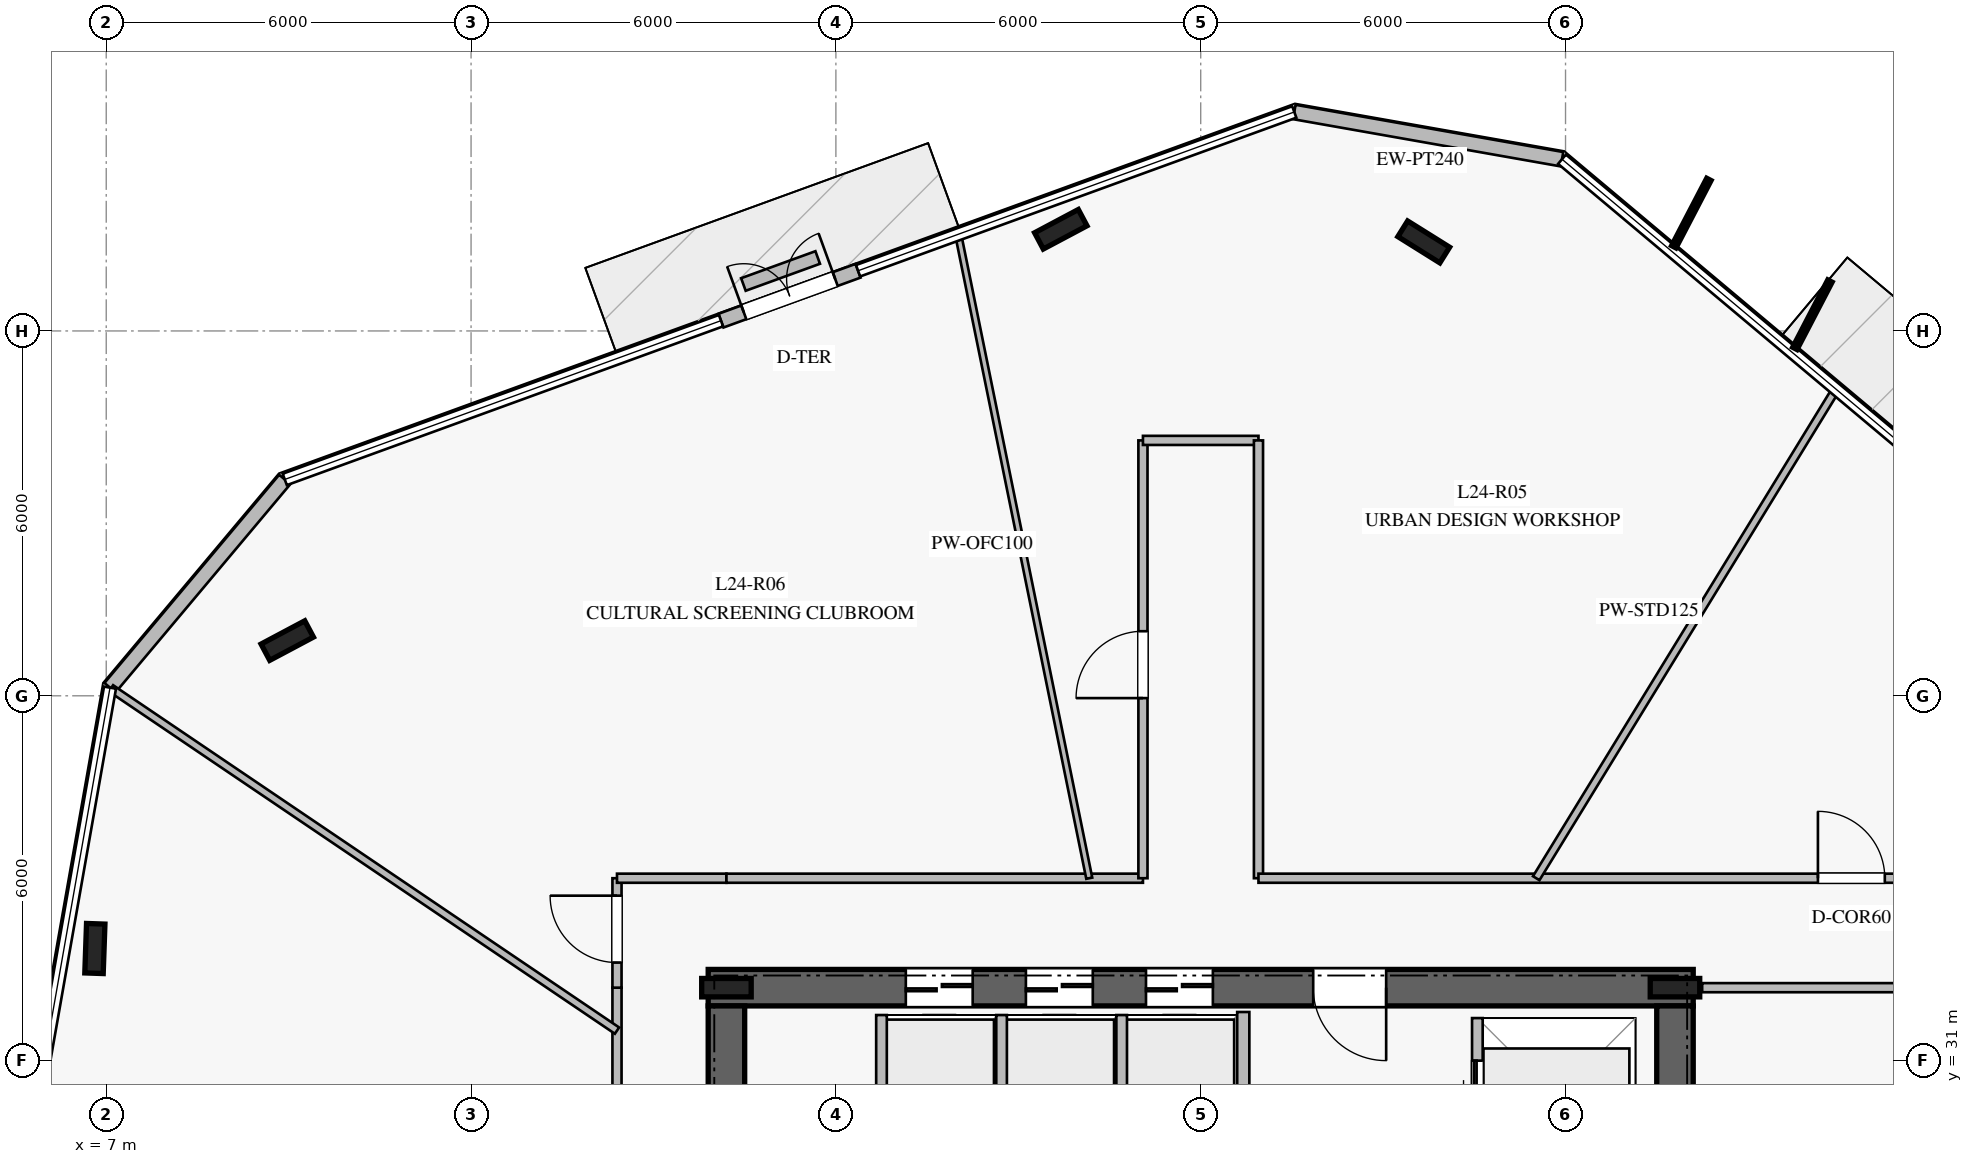
"""IFC4 building model, lengths in metres.
Left out: names, types, materials, properties, quantities, classifications, styles, units other than length and angle.
Written with IfcOpenShell. Run it as: python <this file> out.ifc"""

import sys

from ifc_helpers import new_model, si_unit, direction, frame, frame_2d, origin, origin_2d, place, context, subcontext, project, spatial, rectangle, i_section, extrude, element, fill, save


model = new_model("IFC4")
c1 = context("Model", 3, precision=1e-05, world=origin(), true_north=direction((0.0, 1.0)))
c2 = subcontext(c1, "Body", "Model", "MODEL_VIEW")
j1 = project(units=[si_unit("LENGTHUNIT", "METRE"), si_unit("PLANEANGLEUNIT", "RADIAN")], contexts=[c1])
p1 = place(None, origin())
s1 = spatial("IfcSite", under=j1, at=p1, CompositionType="ELEMENT")
p2 = place(p1, origin())
s2 = spatial("IfcBuilding", under=s1, at=p2, CompositionType="ELEMENT")
p3 = place(p2, frame((0.0, 0.0, 102.4)))
s3 = spatial("IfcBuildingStorey", under=s2, at=p3, CompositionType="ELEMENT", Elevation=102.4)
p4 = place(p3, frame((33.1, 32.2, 0.0), z_axis=(0.0, 0.0, 1.0), x_axis=(-1.0, 0.0, 0.0)))
e1 = element("IfcWall", 1, at=p4, inside=s3, PredefinedType="SHEAR", context=c2, shape_type="SweptSolid", body=[
    extrude(rectangle(XDim=16.2, YDim=0.6, at=frame_2d((8.1, 0.0))), origin(), (0.0, 0.0, 1.0), 3.76),
])
p5 = place(p4, frame((5.05, 0.0, 0.0)))
e2 = element("IfcOpeningElement", 2, at=p5, cuts=e1, PredefinedType="OPENING", context=c2, shape_type="SweptSolid", body=[
    extrude(rectangle(XDim=1.2, YDim=2.25, at=frame_2d((0.6, 1.125))), frame((0.0, 0.31, 0.0), z_axis=(0.0, -1.0, 0.0), x_axis=(1.0, 0.0, 0.0)), (0.0, 0.0, 1.0), 0.62),
])
p6 = place(p4, frame((11.85, 0.0, 0.0)))
e3 = element("IfcOpeningElement", 3, at=p6, cuts=e1, PredefinedType="OPENING", context=c2, shape_type="SweptSolid", body=[
    extrude(rectangle(XDim=1.1, YDim=2.2, at=frame_2d((0.55, 1.1))), frame((0.0, 0.31, 0.0), z_axis=(0.0, -1.0, 0.0), x_axis=(1.0, 0.0, 0.0)), (0.0, 0.0, 1.0), 0.62),
])
p7 = place(p4, frame((9.875, 0.0, 0.0)))
e4 = element("IfcOpeningElement", 4, at=p7, cuts=e1, PredefinedType="OPENING", context=c2, shape_type="SweptSolid", body=[
    extrude(rectangle(XDim=1.1, YDim=2.2, at=frame_2d((0.55, 1.1))), frame((0.0, 0.31, 0.0), z_axis=(0.0, -1.0, 0.0), x_axis=(1.0, 0.0, 0.0)), (0.0, 0.0, 1.0), 0.62),
])
p8 = place(p4, frame((7.9, 0.0, 0.0)))
e5 = element("IfcOpeningElement", 5, at=p8, cuts=e1, PredefinedType="OPENING", context=c2, shape_type="SweptSolid", body=[
    extrude(rectangle(XDim=1.1, YDim=2.2, at=frame_2d((0.55, 1.1))), frame((0.0, 0.31, 0.0), z_axis=(0.0, -1.0, 0.0), x_axis=(1.0, 0.0, 0.0)), (0.0, 0.0, 1.0), 0.62),
])
p9 = place(p3, frame((17.2, 31.9, 0.0), z_axis=(0.0, 0.0, 1.0), x_axis=(0.0, -1.0, 0.0)))
e6 = element("IfcWall", 6, at=p9, inside=s3, PredefinedType="SHEAR", context=c2, shape_type="SweptSolid", body=[
    extrude(rectangle(XDim=13.8, YDim=0.6, at=frame_2d((6.9, 0.0))), origin(), (0.0, 0.0, 1.0), 3.76),
])
p10 = place(p9, frame((2.05, 0.0, 0.0)))
e7 = element("IfcOpeningElement", 7, at=p10, cuts=e6, PredefinedType="OPENING", context=c2, shape_type="SweptSolid", body=[
    extrude(rectangle(XDim=1.5, YDim=2.2, at=frame_2d((0.75, 1.1))), frame((0.0, 0.31, 0.0), z_axis=(0.0, -1.0, 0.0), x_axis=(1.0, 0.0, 0.0)), (0.0, 0.0, 1.0), 0.62),
])
p11 = place(p3, frame((32.8, 18.1, 0.0), z_axis=(0.0, 0.0, 1.0), x_axis=(0.0, 1.0, 0.0)))
e8 = element("IfcWall", 8, at=p11, inside=s3, PredefinedType="SHEAR", context=c2, shape_type="SweptSolid", body=[
    extrude(rectangle(XDim=13.8, YDim=0.6, at=frame_2d((6.9, 0.0))), origin(), (0.0, 0.0, 1.0), 3.76),
])
for number, where, z_axis, x_axis in (
    (9, (32.8, 32.2, 0.0), (0.0, 0.0, 1.0), (1.0, 0.0, 0.0)),
    (10, (17.2, 32.2, 0.0), (0.0, 0.0, 1.0), (1.0, 0.0, 0.0)),
    (11, (28.668, 44.464, 0.0), (0.0, 0.0, 1.0), (-0.848, 0.53, 0.0)),
    (12, (22.699, 44.672, 0.0), (0.0, 0.0, 1.0), (0.883, 0.469, 0.0)),
    (13, (9.977, 37.908, 0.0), (0.0, 0.0, 1.0), (0.883, 0.469, 0.0)),
    (14, (6.813, 32.844, 0.0), (0.0, 0.0, 1.0), (0.035, 0.999, 0.0)),
):
    element("IfcColumn", number, at=place(p3, frame(where, z_axis=z_axis, x_axis=x_axis)), inside=s3, PredefinedType="COLUMN", context=c2, shape_type="SweptSolid", body=[
        extrude(i_section(OverallWidth=0.303, OverallDepth=0.814, WebThickness=0.021, FlangeThickness=0.04, at=origin_2d()), origin(), (0.0, 0.0, 1.0), 4.0),
    ])
p12 = place(p3, frame((30.942, 45.824, 0.0), z_axis=(0.0, 0.0, 1.0), x_axis=(-0.984778610825, 0.173813370204, 0.0)))
e15 = element("IfcWall", 15, at=p12, inside=s3, PredefinedType="STANDARD", context=c2, shape_type="SweptSolid", body=[
    extrude(rectangle(XDim=4.471, YDim=0.24, at=frame_2d((2.235, 0.0))), origin(), (0.0, 0.0, 1.0), 3.76),
])
p13 = place(p3, frame((19.365, 43.99, 0.0), z_axis=(0.0, 0.0, 1.0), x_axis=(-0.939647786753, -0.342143298706, 0.0)))
e16 = element("IfcWall", 16, at=p13, inside=s3, PredefinedType="STANDARD", context=c2, shape_type="SweptSolid", body=[
    extrude(rectangle(XDim=2.4, YDim=0.24, at=frame_2d((1.2, 0.0))), origin(), (0.0, 0.0, 1.0), 3.76),
])
p14 = place(p13, frame((0.4, 0.0, 0.0)))
e17 = element("IfcOpeningElement", 17, at=p14, cuts=e16, PredefinedType="OPENING", context=c2, shape_type="SweptSolid", body=[
    extrude(rectangle(XDim=1.6, YDim=2.25, at=frame_2d((0.8, 1.125))), frame((0.0, 0.13, 0.0), z_axis=(0.0, -1.0, 0.0), x_axis=(1.0, 0.0, 0.0)), (0.0, 0.0, 1.0), 0.26),
])
p15 = place(p3, frame((9.936, 40.558, 0.0), z_axis=(0.0, 0.0, 1.0), x_axis=(-0.642903862685, -0.765946880237, 0.0)))
e18 = element("IfcWall", 18, at=p15, inside=s3, PredefinedType="STANDARD", context=c2, shape_type="SweptSolid", body=[
    extrude(rectangle(XDim=4.47, YDim=0.24, at=frame_2d((2.235, 0.0))), origin(), (0.0, 0.0, 1.0), 3.76),
])
p16 = place(p3, frame((18.701, 44.208, 0.0), z_axis=(0.0, 0.0, 1.0), x_axis=(-0.93985371871, -0.341577205661, 0.0)))
e19 = element("IfcWall", 19, at=p16, inside=s3, PredefinedType="USERDEFINED", context=c2, shape_type="SweptSolid", body=[
    extrude(rectangle(XDim=1.3, YDim=0.22, at=frame_2d((0.65, 0.0))), origin(), (0.0, 0.0, 1.0), 0.4),
])
p17 = place(p3, frame((25.7, 26.65, 0.0), z_axis=(0.0, 0.0, 1.0), x_axis=(0.0, 1.0, 0.0)))
e20 = element("IfcWall", 20, at=p17, inside=s3, PredefinedType="PARTITIONING", context=c2, shape_type="SweptSolid", body=[
    extrude(rectangle(XDim=5.15, YDim=0.2, at=frame_2d((2.575, 0.0))), origin(), (0.0, 0.0, 1.0), 3.76),
])
for number, where, z_axis, x_axis in (
    (21, (19.75, 29.4, 0.0), (0.0, 0.0, 1.0), (0.0, 1.0, 0.0)),
    (22, (21.725, 29.4, 0.0), (0.0, 0.0, 1.0), (0.0, 1.0, 0.0)),
    (23, (23.7, 29.4, 0.0), (0.0, 0.0, 1.0), (0.0, 1.0, 0.0)),
):
    element("IfcWall", number, at=place(p3, frame(where, z_axis=z_axis, x_axis=x_axis)), inside=s3, PredefinedType="PARTITIONING", context=c2, shape_type="SweptSolid", body=[
        extrude(rectangle(XDim=2.35, YDim=0.175, at=frame_2d((1.175, 0.0))), origin(), (0.0, 0.0, 1.0), 3.76),
    ])
p18 = place(p3, frame((29.55, 29.1, 0.0), z_axis=(0.0, 0.0, 1.0), x_axis=(0.0, 1.0, 0.0)))
e24 = element("IfcWall", 24, at=p18, inside=s3, PredefinedType="PARTITIONING", context=c2, shape_type="SweptSolid", body=[
    extrude(rectangle(XDim=2.6, YDim=0.175, at=frame_2d((1.3, 0.0))), origin(), (0.0, 0.0, 1.0), 3.76),
])
p19 = place(p18, frame((0.7, 0.0, 0.0)))
e25 = element("IfcOpeningElement", 25, at=p19, cuts=e24, PredefinedType="OPENING", context=c2, shape_type="SweptSolid", body=[
    extrude(rectangle(XDim=1.2, YDim=2.2, at=frame_2d((0.6, 1.1))), frame((0.0, 0.098, 0.0), z_axis=(0.0, -1.0, 0.0), x_axis=(1.0, 0.0, 0.0)), (0.0, 0.0, 1.0), 0.195),
])
p20 = place(p3, frame((15.4, 25.95, 0.0), z_axis=(0.0, 0.0, 1.0), x_axis=(0.0, 1.0, 0.0)))
e26 = element("IfcWall", 26, at=p20, inside=s3, PredefinedType="PARTITIONING", context=c2, shape_type="SweptSolid", body=[
    extrude(rectangle(XDim=6.25, YDim=0.15, at=frame_2d((3.125, 0.0))), origin(), (0.0, 0.0, 1.0), 3.21),
])
p21 = place(p3, frame((15.4, 32.2, 0.0), z_axis=(0.0, 0.0, 1.0), x_axis=(0.0, 1.0, 0.0)))
e27 = element("IfcWall", 27, at=p21, inside=s3, PredefinedType="PARTITIONING", context=c2, shape_type="SweptSolid", body=[
    extrude(rectangle(XDim=1.8, YDim=0.15, at=frame_2d((0.9, 0.0))), origin(), (0.0, 0.0, 1.0), 3.21),
])
p22 = place(p21, frame((0.413, 0.0, 0.0)))
e28 = element("IfcOpeningElement", 28, at=p22, cuts=e27, PredefinedType="OPENING", context=c2, shape_type="SweptSolid", body=[
    extrude(rectangle(XDim=1.1, YDim=2.2, at=frame_2d((0.55, 1.1))), frame((0.0, 0.085, 0.0), z_axis=(0.0, -1.0, 0.0), x_axis=(1.0, 0.0, 0.0)), (0.0, 0.0, 1.0), 0.17),
])
p23 = place(p3, frame((15.4, 34.0, 0.0), z_axis=(0.0, 0.0, 1.0), x_axis=(1.0, 0.0, 0.0)))
e29 = element("IfcWall", 29, at=p23, inside=s3, PredefinedType="PARTITIONING", context=c2, shape_type="SweptSolid", body=[
    extrude(rectangle(XDim=1.8, YDim=0.15, at=frame_2d((0.9, 0.0))), origin(), (0.0, 0.0, 1.0), 3.76),
])
p24 = place(p3, frame((17.2, 34.0, 0.0), z_axis=(0.0, 0.0, 1.0), x_axis=(1.0, 0.0, 0.0)))
e30 = element("IfcWall", 30, at=p24, inside=s3, PredefinedType="PARTITIONING", context=c2, shape_type="SweptSolid", body=[
    extrude(rectangle(XDim=6.85, YDim=0.15, at=frame_2d((3.425, 0.0))), origin(), (0.0, 0.0, 1.0), 3.21),
])
p25 = place(p3, frame((24.05, 34.0, 0.0), z_axis=(0.0, 0.0, 1.0), x_axis=(0.0, 1.0, 0.0)))
e31 = element("IfcWall", 31, at=p25, inside=s3, PredefinedType="PARTITIONING", context=c2, shape_type="SweptSolid", body=[
    extrude(rectangle(XDim=7.2, YDim=0.15, at=frame_2d((3.6, 0.0))), origin(), (0.0, 0.0, 1.0), 3.36),
])
p26 = place(p25, frame((2.962, 0.0, 0.0)))
e32 = element("IfcOpeningElement", 32, at=p26, cuts=e31, PredefinedType="OPENING", context=c2, shape_type="SweptSolid", body=[
    extrude(rectangle(XDim=1.1, YDim=2.2, at=frame_2d((0.55, 1.1))), frame((0.0, 0.085, 0.0), z_axis=(0.0, -1.0, 0.0), x_axis=(1.0, 0.0, 0.0)), (0.0, 0.0, 1.0), 0.17),
])
p27 = place(p3, frame((24.05, 41.2, 0.0), z_axis=(0.0, 0.0, 1.0), x_axis=(1.0, 0.0, 0.0)))
e33 = element("IfcWall", 33, at=p27, inside=s3, PredefinedType="PARTITIONING", context=c2, shape_type="SweptSolid", body=[
    extrude(rectangle(XDim=1.9, YDim=0.15, at=frame_2d((0.95, 0.0))), origin(), (0.0, 0.0, 1.0), 3.76),
])
p28 = place(p3, frame((25.95, 41.2, 0.0), z_axis=(0.0, 0.0, 1.0), x_axis=(0.0, -1.0, 0.0)))
e34 = element("IfcWall", 34, at=p28, inside=s3, PredefinedType="PARTITIONING", context=c2, shape_type="SweptSolid", body=[
    extrude(rectangle(XDim=7.2, YDim=0.15, at=frame_2d((3.6, 0.0))), origin(), (0.0, 0.0, 1.0), 3.36),
])
p29 = place(p3, frame((25.95, 34.0, 0.0), z_axis=(0.0, 0.0, 1.0), x_axis=(1.0, 0.0, 0.0)))
e35 = element("IfcWall", 35, at=p29, inside=s3, PredefinedType="PARTITIONING", context=c2, shape_type="SweptSolid", body=[
    extrude(rectangle(XDim=15.25, YDim=0.15, at=frame_2d((7.625, 0.0))), origin(), (0.0, 0.0, 1.0), 3.21),
])
p30 = place(p29, frame((9.201, 0.0, 0.0)))
e36 = element("IfcOpeningElement", 36, at=p30, cuts=e35, PredefinedType="OPENING", context=c2, shape_type="SweptSolid", body=[
    extrude(rectangle(XDim=1.1, YDim=2.2, at=frame_2d((0.55, 1.1))), frame((0.0, 0.085, 0.0), z_axis=(0.0, -1.0, 0.0), x_axis=(1.0, 0.0, 0.0)), (0.0, 0.0, 1.0), 0.17),
])
p31 = place(p3, frame((41.2, 32.2, 0.0), z_axis=(0.0, 0.0, 1.0), x_axis=(-1.0, 0.0, 0.0)))
e37 = element("IfcWall", 37, at=p31, inside=s3, PredefinedType="PARTITIONING", context=c2, shape_type="SweptSolid", body=[
    extrude(rectangle(XDim=7.953, YDim=0.15, at=frame_2d((3.977, 0.0))), origin(), (0.0, 0.0, 1.0), 3.21),
])
p32 = place(p3, frame((30.518, 34.0, 0.0), z_axis=(0.0, 0.0, 1.0), x_axis=(0.522673308886, 0.852533056355, 0.0)))
e38 = element("IfcWall", 38, at=p32, inside=s3, PredefinedType="PARTITIONING", context=c2, shape_type="SweptSolid", body=[
    extrude(rectangle(XDim=9.417, YDim=0.125, at=frame_2d((4.708, 0.0))), origin(), (0.0, 0.0, 1.0), 3.16),
])
p33 = place(p3, frame((23.167, 34.0, 0.0), z_axis=(0.0, 0.0, 1.0), x_axis=(-0.199561430281, 0.979885317547, 0.0)))
e39 = element("IfcWall", 39, at=p33, inside=s3, PredefinedType="MOVABLE", context=c2, shape_type="SweptSolid", body=[
    extrude(rectangle(XDim=10.789, YDim=0.1, at=frame_2d((5.395, 0.0))), origin(), (0.0, 0.0, 1.0), 3.16),
])
p34 = place(p3, frame((15.4, 31.494, 0.0), z_axis=(0.0, 0.0, 1.0), x_axis=(-0.828304308863, 0.560278477116, 0.0)))
e40 = element("IfcWall", 40, at=p34, inside=s3, PredefinedType="PARTITIONING", context=c2, shape_type="SweptSolid", body=[
    extrude(rectangle(XDim=10.047, YDim=0.125, at=frame_2d((5.023, 0.0))), origin(), (0.0, 0.0, 1.0), 3.16),
])
p35 = place(p14, frame((1.6, 0.0, 0.0), z_axis=(0.0, 0.0, 1.0), x_axis=(-1.0, 0.0, 0.0)))
e41 = element("IfcDoor", 41, at=p35, inside=s3, OperationType="DOUBLE_DOOR_SINGLE_SWING", PredefinedType="DOOR", context=c2, shape_type="SweptSolid", body=[
    extrude(rectangle(XDim=1.6, YDim=2.25, at=frame_2d((0.8, 1.125))), frame((0.0, 0.025, 0.0), z_axis=(0.0, -1.0, 0.0), x_axis=(1.0, 0.0, 0.0)), (0.0, 0.0, 1.0), 0.05),
])
fill(e17, e41)
p36 = place(p5, origin())
e42 = element("IfcDoor", 42, at=p36, inside=s3, OperationType="SINGLE_SWING_LEFT", PredefinedType="DOOR", context=c2, shape_type="SweptSolid", body=[
    extrude(rectangle(XDim=1.2, YDim=2.25, at=frame_2d((0.6, 1.125))), frame((0.0, 0.025, 0.0), z_axis=(0.0, -1.0, 0.0), x_axis=(1.0, 0.0, 0.0)), (0.0, 0.0, 1.0), 0.05),
])
fill(e2, e42)
p37 = place(p6, origin())
e43 = element("IfcDoor", 43, at=p37, inside=s3, OperationType="DOUBLE_DOOR_SLIDING", PredefinedType="DOOR", context=c2, shape_type="SweptSolid", body=[
    extrude(rectangle(XDim=1.1, YDim=2.2, at=frame_2d((0.55, 1.1))), frame((0.0, 0.025, 0.0), z_axis=(0.0, -1.0, 0.0), x_axis=(1.0, 0.0, 0.0)), (0.0, 0.0, 1.0), 0.05),
])
fill(e3, e43)
p38 = place(p7, origin())
e44 = element("IfcDoor", 44, at=p38, inside=s3, OperationType="DOUBLE_DOOR_SLIDING", PredefinedType="DOOR", context=c2, shape_type="SweptSolid", body=[
    extrude(rectangle(XDim=1.1, YDim=2.2, at=frame_2d((0.55, 1.1))), frame((0.0, 0.025, 0.0), z_axis=(0.0, -1.0, 0.0), x_axis=(1.0, 0.0, 0.0)), (0.0, 0.0, 1.0), 0.05),
])
fill(e4, e44)
p39 = place(p8, origin())
e45 = element("IfcDoor", 45, at=p39, inside=s3, OperationType="DOUBLE_DOOR_SLIDING", PredefinedType="DOOR", context=c2, shape_type="SweptSolid", body=[
    extrude(rectangle(XDim=1.1, YDim=2.2, at=frame_2d((0.55, 1.1))), frame((0.0, 0.025, 0.0), z_axis=(0.0, -1.0, 0.0), x_axis=(1.0, 0.0, 0.0)), (0.0, 0.0, 1.0), 0.05),
])
fill(e5, e45)
p40 = place(p19, origin())
e46 = element("IfcDoor", 46, at=p40, inside=s3, OperationType="DOUBLE_DOOR_SLIDING", PredefinedType="DOOR", context=c2, shape_type="SweptSolid", body=[
    extrude(rectangle(XDim=1.2, YDim=2.2, at=frame_2d((0.6, 1.1))), frame((0.0, 0.025, 0.0), z_axis=(0.0, -1.0, 0.0), x_axis=(1.0, 0.0, 0.0)), (0.0, 0.0, 1.0), 0.05),
])
fill(e25, e46)
p41 = place(p30, origin())
e47 = element("IfcDoor", 47, at=p41, inside=s3, OperationType="SINGLE_SWING_LEFT", PredefinedType="DOOR", context=c2, shape_type="SweptSolid", body=[
    extrude(rectangle(XDim=1.1, YDim=2.2, at=frame_2d((0.55, 1.1))), frame((0.0, 0.025, 0.0), z_axis=(0.0, -1.0, 0.0), x_axis=(1.0, 0.0, 0.0)), (0.0, 0.0, 1.0), 0.05),
])
fill(e36, e47)
p42 = place(p26, origin())
e48 = element("IfcDoor", 48, at=p42, inside=s3, OperationType="SINGLE_SWING_LEFT", PredefinedType="DOOR", context=c2, shape_type="SweptSolid", body=[
    extrude(rectangle(XDim=1.1, YDim=2.2, at=frame_2d((0.55, 1.1))), frame((0.0, 0.025, 0.0), z_axis=(0.0, -1.0, 0.0), x_axis=(1.0, 0.0, 0.0)), (0.0, 0.0, 1.0), 0.05),
])
fill(e32, e48)
p43 = place(p22, origin())
e49 = element("IfcDoor", 49, at=p43, inside=s3, OperationType="SINGLE_SWING_RIGHT", PredefinedType="DOOR", context=c2, shape_type="SweptSolid", body=[
    extrude(rectangle(XDim=1.1, YDim=2.2, at=frame_2d((0.55, 1.1))), frame((0.0, 0.025, 0.0), z_axis=(0.0, -1.0, 0.0), x_axis=(1.0, 0.0, 0.0)), (0.0, 0.0, 1.0), 0.05),
])
fill(e28, e49)
save(model, sys.argv[1])
